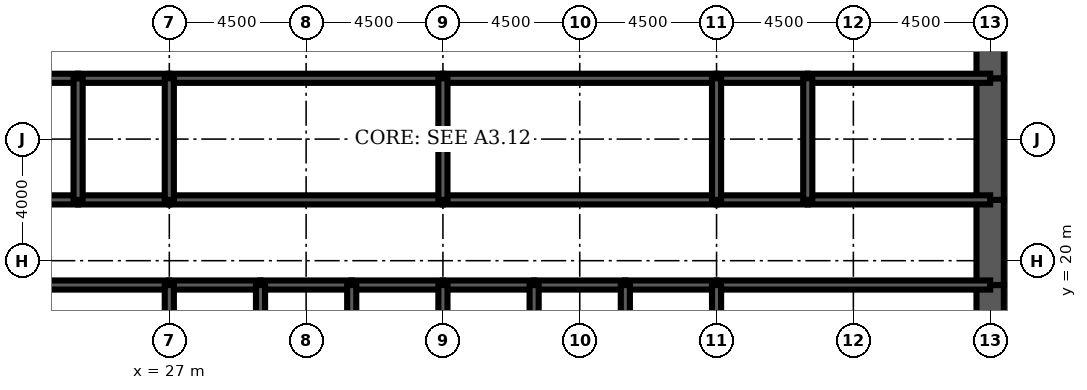
"""IFC4 building model, lengths in metres.
Left out: names, types, materials, properties, quantities, classifications, styles, units other than length and angle.
Written with IfcOpenShell. Run it as: python <this file> out.ifc"""

import sys

from ifc_helpers import new_model, si_unit, direction, frame, frame_2d, origin, place, context, subcontext, project, spatial, rectangle, extrude, element, fill, save


model = new_model("IFC4")
c1 = context("Model", 3, precision=1e-05, world=origin(), true_north=direction((0.0, 1.0)))
c2 = subcontext(c1, "Body", "Model", "MODEL_VIEW")
j1 = project(units=[si_unit("LENGTHUNIT", "METRE"), si_unit("PLANEANGLEUNIT", "RADIAN")], contexts=[c1])
p1 = place(None, origin())
s1 = spatial("IfcSite", under=j1, at=p1, CompositionType="ELEMENT")
p2 = place(p1, origin())
s2 = spatial("IfcBuilding", under=s1, at=p2, CompositionType="ELEMENT")
p3 = place(p2, frame((0.0, 0.0, 50.0)))
s3 = spatial("IfcBuildingStorey", under=s2, at=p3, CompositionType="ELEMENT", Elevation=50.0)
p4 = place(p3, frame((54.0, 16.0, 0.0), z_axis=(0.0, 0.0, 1.0), x_axis=(0.0, 1.0, 0.0)))
e1 = element("IfcWall", 1, at=p4, inside=s3, PredefinedType="SHEAR", context=c2, shape_type="SweptSolid", body=[
    extrude(rectangle(XDim=3.2, YDim=0.9, at=frame_2d((1.6, 0.0))), origin(), (0.0, 0.0, 1.0), 4.5),
])
p5 = place(p3, frame((54.0, 19.2, 0.0), z_axis=(0.0, 0.0, 1.0), x_axis=(0.0, 1.0, 0.0)))
e2 = element("IfcWall", 2, at=p5, inside=s3, PredefinedType="SHEAR", context=c2, shape_type="SweptSolid", body=[
    extrude(rectangle(XDim=2.8, YDim=0.9, at=frame_2d((1.4, 0.0))), origin(), (0.0, 0.0, 1.0), 4.5),
])
p6 = place(p5, frame((0.4, 0.0, 0.0)))
e3 = element("IfcOpeningElement", 3, at=p6, cuts=e2, PredefinedType="OPENING", context=c2, shape_type="SweptSolid", body=[
    extrude(rectangle(XDim=1.8, YDim=2.1, at=frame_2d((0.9, 1.05))), frame((0.0, 0.46, 0.0), z_axis=(0.0, -1.0, 0.0), x_axis=(1.0, 0.0, 0.0)), (0.0, 0.0, 1.0), 0.92),
])
p7 = place(p3, frame((54.0, 22.0, 0.0), z_axis=(0.0, 0.0, 1.0), x_axis=(0.0, 1.0, 0.0)))
e4 = element("IfcWall", 4, at=p7, inside=s3, PredefinedType="SHEAR", context=c2, shape_type="SweptSolid", body=[
    extrude(rectangle(XDim=4.0, YDim=0.9, at=frame_2d((2.0, 0.0))), origin(), (0.0, 0.0, 1.0), 4.5),
])
p8 = place(p3, frame((54.0, 26.0, 0.0), z_axis=(0.0, 0.0, 1.0), x_axis=(0.0, 1.0, 0.0)))
e5 = element("IfcWall", 5, at=p8, inside=s3, PredefinedType="SHEAR", context=c2, shape_type="SweptSolid", body=[
    extrude(rectangle(XDim=2.8, YDim=0.9, at=frame_2d((1.4, 0.0))), origin(), (0.0, 0.0, 1.0), 4.5),
])
p9 = place(p8, frame((0.6, 0.0, 0.0)))
e6 = element("IfcOpeningElement", 6, at=p9, cuts=e5, PredefinedType="OPENING", context=c2, shape_type="SweptSolid", body=[
    extrude(rectangle(XDim=1.8, YDim=2.1, at=frame_2d((0.9, 1.05))), frame((0.0, 0.46, 0.0), z_axis=(0.0, -1.0, 0.0), x_axis=(1.0, 0.0, 0.0)), (0.0, 0.0, 1.0), 0.92),
])
p10 = place(p3, frame((18.0, 19.2, 0.0), z_axis=(0.0, 0.0, 1.0), x_axis=(1.0, 0.0, 0.0)))
e7 = element("IfcWall", 7, at=p10, inside=s3, PredefinedType="SOLIDWALL", context=c2, shape_type="SweptSolid", body=[
    extrude(rectangle(XDim=9.0, YDim=0.3, at=frame_2d((4.5, 0.0))), origin(), (0.0, 0.0, 1.0), 4.5),
])
p11 = place(p10, frame((0.65, 0.0, 0.0)))
e8 = element("IfcOpeningElement", 8, at=p11, cuts=e7, PredefinedType="OPENING", context=c2, shape_type="SweptSolid", body=[
    extrude(rectangle(XDim=1.0, YDim=2.1, at=frame_2d((0.5, 1.05))), frame((0.0, 0.16, 0.0), z_axis=(0.0, -1.0, 0.0), x_axis=(1.0, 0.0, 0.0)), (0.0, 0.0, 1.0), 0.32),
])
p12 = place(p3, frame((27.0, 19.2, 0.0), z_axis=(0.0, 0.0, 1.0), x_axis=(1.0, 0.0, 0.0)))
e9 = element("IfcWall", 9, at=p12, inside=s3, PredefinedType="SOLIDWALL", context=c2, shape_type="SweptSolid", body=[
    extrude(rectangle(XDim=3.0, YDim=0.3, at=frame_2d((1.5, 0.0))), origin(), (0.0, 0.0, 1.0), 4.5),
])
p13 = place(p12, frame((0.95, 0.0, 0.0)))
e10 = element("IfcOpeningElement", 10, at=p13, cuts=e9, PredefinedType="OPENING", context=c2, shape_type="SweptSolid", body=[
    extrude(rectangle(XDim=1.1, YDim=2.2, at=frame_2d((0.55, 1.1))), frame((0.0, 0.16, 0.0), z_axis=(0.0, -1.0, 0.0), x_axis=(1.0, 0.0, 0.0)), (0.0, 0.0, 1.0), 0.32),
])
p14 = place(p3, frame((30.0, 19.2, 0.0), z_axis=(0.0, 0.0, 1.0), x_axis=(1.0, 0.0, 0.0)))
e11 = element("IfcWall", 11, at=p14, inside=s3, PredefinedType="SOLIDWALL", context=c2, shape_type="SweptSolid", body=[
    extrude(rectangle(XDim=3.0, YDim=0.3, at=frame_2d((1.5, 0.0))), origin(), (0.0, 0.0, 1.0), 4.5),
])
p15 = place(p14, frame((0.95, 0.0, 0.0)))
e12 = element("IfcOpeningElement", 12, at=p15, cuts=e11, PredefinedType="OPENING", context=c2, shape_type="SweptSolid", body=[
    extrude(rectangle(XDim=1.1, YDim=2.2, at=frame_2d((0.55, 1.1))), frame((0.0, 0.16, 0.0), z_axis=(0.0, -1.0, 0.0), x_axis=(1.0, 0.0, 0.0)), (0.0, 0.0, 1.0), 0.32),
])
p16 = place(p3, frame((33.0, 19.2, 0.0), z_axis=(0.0, 0.0, 1.0), x_axis=(1.0, 0.0, 0.0)))
e13 = element("IfcWall", 13, at=p16, inside=s3, PredefinedType="SOLIDWALL", context=c2, shape_type="SweptSolid", body=[
    extrude(rectangle(XDim=3.0, YDim=0.3, at=frame_2d((1.5, 0.0))), origin(), (0.0, 0.0, 1.0), 4.5),
])
p17 = place(p16, frame((0.95, 0.0, 0.0)))
e14 = element("IfcOpeningElement", 14, at=p17, cuts=e13, PredefinedType="OPENING", context=c2, shape_type="SweptSolid", body=[
    extrude(rectangle(XDim=1.1, YDim=2.2, at=frame_2d((0.55, 1.1))), frame((0.0, 0.16, 0.0), z_axis=(0.0, -1.0, 0.0), x_axis=(1.0, 0.0, 0.0)), (0.0, 0.0, 1.0), 0.32),
])
p18 = place(p3, frame((36.0, 19.2, 0.0), z_axis=(0.0, 0.0, 1.0), x_axis=(1.0, 0.0, 0.0)))
e15 = element("IfcWall", 15, at=p18, inside=s3, PredefinedType="SOLIDWALL", context=c2, shape_type="SweptSolid", body=[
    extrude(rectangle(XDim=3.0, YDim=0.3, at=frame_2d((1.5, 0.0))), origin(), (0.0, 0.0, 1.0), 4.5),
])
p19 = place(p18, frame((0.95, 0.0, 0.0)))
e16 = element("IfcOpeningElement", 16, at=p19, cuts=e15, PredefinedType="OPENING", context=c2, shape_type="SweptSolid", body=[
    extrude(rectangle(XDim=1.1, YDim=2.2, at=frame_2d((0.55, 1.1))), frame((0.0, 0.16, 0.0), z_axis=(0.0, -1.0, 0.0), x_axis=(1.0, 0.0, 0.0)), (0.0, 0.0, 1.0), 0.32),
])
for number, where, z_axis, x_axis in (
    (17, (39.0, 19.2, 0.0), (0.0, 0.0, 1.0), (1.0, 0.0, 0.0)),
    (18, (42.0, 19.2, 0.0), (0.0, 0.0, 1.0), (1.0, 0.0, 0.0)),
):
    element("IfcWall", number, at=place(p3, frame(where, z_axis=z_axis, x_axis=x_axis)), inside=s3, PredefinedType="SOLIDWALL", context=c2, shape_type="SweptSolid", body=[
        extrude(rectangle(XDim=3.0, YDim=0.3, at=frame_2d((1.5, 0.0))), origin(), (0.0, 0.0, 1.0), 4.5),
    ])
p20 = place(p3, frame((45.0, 19.2, 0.0), z_axis=(0.0, 0.0, 1.0), x_axis=(1.0, 0.0, 0.0)))
e19 = element("IfcWall", 19, at=p20, inside=s3, PredefinedType="SOLIDWALL", context=c2, shape_type="SweptSolid", body=[
    extrude(rectangle(XDim=9.0, YDim=0.3, at=frame_2d((4.5, 0.0))), origin(), (0.0, 0.0, 1.0), 4.5),
])
p21 = place(p20, frame((7.35, 0.0, 0.0)))
e20 = element("IfcOpeningElement", 20, at=p21, cuts=e19, PredefinedType="OPENING", context=c2, shape_type="SweptSolid", body=[
    extrude(rectangle(XDim=1.0, YDim=2.1, at=frame_2d((0.5, 1.05))), frame((0.0, 0.16, 0.0), z_axis=(0.0, -1.0, 0.0), x_axis=(1.0, 0.0, 0.0)), (0.0, 0.0, 1.0), 0.32),
])
p22 = place(p3, frame((18.0, 22.0, 0.0), z_axis=(0.0, 0.0, 1.0), x_axis=(1.0, 0.0, 0.0)))
e21 = element("IfcWall", 21, at=p22, inside=s3, PredefinedType="SOLIDWALL", context=c2, shape_type="SweptSolid", body=[
    extrude(rectangle(XDim=6.0, YDim=0.3, at=frame_2d((3.0, 0.0))), origin(), (0.0, 0.0, 1.0), 4.5),
])
p23 = place(p22, frame((2.0, 0.0, 0.0)))
e22 = element("IfcOpeningElement", 22, at=p23, cuts=e21, PredefinedType="OPENING", context=c2, shape_type="SweptSolid", body=[
    extrude(rectangle(XDim=1.0, YDim=2.1, at=frame_2d((0.5, 1.05))), frame((0.0, 0.16, 0.0), z_axis=(0.0, -1.0, 0.0), x_axis=(1.0, 0.0, 0.0)), (0.0, 0.0, 1.0), 0.32),
])
p24 = place(p3, frame((24.0, 22.0, 0.0), z_axis=(0.0, 0.0, 1.0), x_axis=(1.0, 0.0, 0.0)))
e23 = element("IfcWall", 23, at=p24, inside=s3, PredefinedType="SOLIDWALL", context=c2, shape_type="SweptSolid", body=[
    extrude(rectangle(XDim=3.0, YDim=0.3, at=frame_2d((1.5, 0.0))), origin(), (0.0, 0.0, 1.0), 4.5),
])
p25 = place(p24, frame((1.0, 0.0, 0.0)))
e24 = element("IfcOpeningElement", 24, at=p25, cuts=e23, PredefinedType="OPENING", context=c2, shape_type="SweptSolid", body=[
    extrude(rectangle(XDim=1.0, YDim=2.1, at=frame_2d((0.5, 1.05))), frame((0.0, 0.16, 0.0), z_axis=(0.0, -1.0, 0.0), x_axis=(1.0, 0.0, 0.0)), (0.0, 0.0, 1.0), 0.32),
])
p26 = place(p3, frame((27.0, 22.0, 0.0), z_axis=(0.0, 0.0, 1.0), x_axis=(1.0, 0.0, 0.0)))
e25 = element("IfcWall", 25, at=p26, inside=s3, PredefinedType="SOLIDWALL", context=c2, shape_type="SweptSolid", body=[
    extrude(rectangle(XDim=9.0, YDim=0.3, at=frame_2d((4.5, 0.0))), origin(), (0.0, 0.0, 1.0), 4.5),
])
p27 = place(p26, frame((4.0, 0.0, 0.0)))
e26 = element("IfcOpeningElement", 26, at=p27, cuts=e25, PredefinedType="OPENING", context=c2, shape_type="SweptSolid", body=[
    extrude(rectangle(XDim=1.0, YDim=2.1, at=frame_2d((0.5, 1.05))), frame((0.0, 0.16, 0.0), z_axis=(0.0, -1.0, 0.0), x_axis=(1.0, 0.0, 0.0)), (0.0, 0.0, 1.0), 0.32),
])
p28 = place(p3, frame((36.0, 22.0, 0.0), z_axis=(0.0, 0.0, 1.0), x_axis=(1.0, 0.0, 0.0)))
e27 = element("IfcWall", 27, at=p28, inside=s3, PredefinedType="SOLIDWALL", context=c2, shape_type="SweptSolid", body=[
    extrude(rectangle(XDim=9.0, YDim=0.3, at=frame_2d((4.5, 0.0))), origin(), (0.0, 0.0, 1.0), 4.5),
])
p29 = place(p28, frame((4.0, 0.0, 0.0)))
e28 = element("IfcOpeningElement", 28, at=p29, cuts=e27, PredefinedType="OPENING", context=c2, shape_type="SweptSolid", body=[
    extrude(rectangle(XDim=1.0, YDim=2.1, at=frame_2d((0.5, 1.05))), frame((0.0, 0.16, 0.0), z_axis=(0.0, -1.0, 0.0), x_axis=(1.0, 0.0, 0.0)), (0.0, 0.0, 1.0), 0.32),
])
p30 = place(p3, frame((45.0, 22.0, 0.0), z_axis=(0.0, 0.0, 1.0), x_axis=(1.0, 0.0, 0.0)))
e29 = element("IfcWall", 29, at=p30, inside=s3, PredefinedType="SOLIDWALL", context=c2, shape_type="SweptSolid", body=[
    extrude(rectangle(XDim=3.0, YDim=0.3, at=frame_2d((1.5, 0.0))), origin(), (0.0, 0.0, 1.0), 4.5),
])
p31 = place(p30, frame((1.0, 0.0, 0.0)))
e30 = element("IfcOpeningElement", 30, at=p31, cuts=e29, PredefinedType="OPENING", context=c2, shape_type="SweptSolid", body=[
    extrude(rectangle(XDim=1.0, YDim=2.1, at=frame_2d((0.5, 1.05))), frame((0.0, 0.16, 0.0), z_axis=(0.0, -1.0, 0.0), x_axis=(1.0, 0.0, 0.0)), (0.0, 0.0, 1.0), 0.32),
])
p32 = place(p3, frame((48.0, 22.0, 0.0), z_axis=(0.0, 0.0, 1.0), x_axis=(1.0, 0.0, 0.0)))
e31 = element("IfcWall", 31, at=p32, inside=s3, PredefinedType="SOLIDWALL", context=c2, shape_type="SweptSolid", body=[
    extrude(rectangle(XDim=6.0, YDim=0.3, at=frame_2d((3.0, 0.0))), origin(), (0.0, 0.0, 1.0), 4.5),
])
p33 = place(p32, frame((2.0, 0.0, 0.0)))
e32 = element("IfcOpeningElement", 32, at=p33, cuts=e31, PredefinedType="OPENING", context=c2, shape_type="SweptSolid", body=[
    extrude(rectangle(XDim=1.0, YDim=2.1, at=frame_2d((0.5, 1.05))), frame((0.0, 0.16, 0.0), z_axis=(0.0, -1.0, 0.0), x_axis=(1.0, 0.0, 0.0)), (0.0, 0.0, 1.0), 0.32),
])
p34 = place(p32, frame((4.3, 0.0, 0.0)))
e33 = element("IfcOpeningElement", 33, at=p34, cuts=e31, PredefinedType="OPENING", context=c2, shape_type="SweptSolid", body=[
    extrude(rectangle(XDim=1.0, YDim=2.1, at=frame_2d((0.5, 1.05))), frame((0.0, 0.16, 0.0), z_axis=(0.0, -1.0, 0.0), x_axis=(1.0, 0.0, 0.0)), (0.0, 0.0, 1.0), 0.32),
])
p35 = place(p3, frame((18.0, 26.0, 0.0), z_axis=(0.0, 0.0, 1.0), x_axis=(1.0, 0.0, 0.0)))
e34 = element("IfcWall", 34, at=p35, inside=s3, PredefinedType="SOLIDWALL", context=c2, shape_type="SweptSolid", body=[
    extrude(rectangle(XDim=6.0, YDim=0.3, at=frame_2d((3.0, 0.0))), origin(), (0.0, 0.0, 1.0), 4.5),
])
p36 = place(p3, frame((24.0, 26.0, 0.0), z_axis=(0.0, 0.0, 1.0), x_axis=(1.0, 0.0, 0.0)))
e35 = element("IfcWall", 35, at=p36, inside=s3, PredefinedType="SOLIDWALL", context=c2, shape_type="SweptSolid", body=[
    extrude(rectangle(XDim=3.0, YDim=0.3, at=frame_2d((1.5, 0.0))), origin(), (0.0, 0.0, 1.0), 4.5),
])
for number, where, z_axis, x_axis in (
    (36, (27.0, 26.0, 0.0), (0.0, 0.0, 1.0), (1.0, 0.0, 0.0)),
    (37, (36.0, 26.0, 0.0), (0.0, 0.0, 1.0), (1.0, 0.0, 0.0)),
):
    element("IfcWall", number, at=place(p3, frame(where, z_axis=z_axis, x_axis=x_axis)), inside=s3, PredefinedType="SOLIDWALL", context=c2, shape_type="SweptSolid", body=[
        extrude(rectangle(XDim=9.0, YDim=0.3, at=frame_2d((4.5, 0.0))), origin(), (0.0, 0.0, 1.0), 4.5),
    ])
p37 = place(p3, frame((45.0, 26.0, 0.0), z_axis=(0.0, 0.0, 1.0), x_axis=(1.0, 0.0, 0.0)))
e38 = element("IfcWall", 38, at=p37, inside=s3, PredefinedType="SOLIDWALL", context=c2, shape_type="SweptSolid", body=[
    extrude(rectangle(XDim=3.0, YDim=0.3, at=frame_2d((1.5, 0.0))), origin(), (0.0, 0.0, 1.0), 4.5),
])
p38 = place(p3, frame((48.0, 26.0, 0.0), z_axis=(0.0, 0.0, 1.0), x_axis=(1.0, 0.0, 0.0)))
e39 = element("IfcWall", 39, at=p38, inside=s3, PredefinedType="SOLIDWALL", context=c2, shape_type="SweptSolid", body=[
    extrude(rectangle(XDim=6.0, YDim=0.3, at=frame_2d((3.0, 0.0))), origin(), (0.0, 0.0, 1.0), 4.5),
])
for number, where, z_axis, x_axis in (
    (40, (27.0, 16.0, 0.0), (0.0, 0.0, 1.0), (0.0, 1.0, 0.0)),
    (41, (30.0, 16.0, 0.0), (0.0, 0.0, 1.0), (0.0, 1.0, 0.0)),
    (42, (33.0, 16.0, 0.0), (0.0, 0.0, 1.0), (0.0, 1.0, 0.0)),
    (43, (36.0, 16.0, 0.0), (0.0, 0.0, 1.0), (0.0, 1.0, 0.0)),
    (44, (39.0, 16.0, 0.0), (0.0, 0.0, 1.0), (0.0, 1.0, 0.0)),
    (45, (42.0, 16.0, 0.0), (0.0, 0.0, 1.0), (0.0, 1.0, 0.0)),
    (46, (45.0, 16.0, 0.0), (0.0, 0.0, 1.0), (0.0, 1.0, 0.0)),
):
    element("IfcWall", number, at=place(p3, frame(where, z_axis=z_axis, x_axis=x_axis)), inside=s3, PredefinedType="SOLIDWALL", context=c2, shape_type="SweptSolid", body=[
        extrude(rectangle(XDim=3.2, YDim=0.3, at=frame_2d((1.6, 0.0))), origin(), (0.0, 0.0, 1.0), 4.5),
    ])
for number, where, z_axis, x_axis in (
    (47, (24.0, 22.0, 0.0), (0.0, 0.0, 1.0), (0.0, 1.0, 0.0)),
    (48, (27.0, 22.0, 0.0), (0.0, 0.0, 1.0), (0.0, 1.0, 0.0)),
    (49, (36.0, 22.0, 0.0), (0.0, 0.0, 1.0), (0.0, 1.0, 0.0)),
    (50, (45.0, 22.0, 0.0), (0.0, 0.0, 1.0), (0.0, 1.0, 0.0)),
    (51, (48.0, 22.0, 0.0), (0.0, 0.0, 1.0), (0.0, 1.0, 0.0)),
):
    element("IfcWall", number, at=place(p3, frame(where, z_axis=z_axis, x_axis=x_axis)), inside=s3, PredefinedType="SOLIDWALL", context=c2, shape_type="SweptSolid", body=[
        extrude(rectangle(XDim=4.0, YDim=0.3, at=frame_2d((2.0, 0.0))), origin(), (0.0, 0.0, 1.0), 4.5),
    ])
p39 = place(p3, frame((38.0, 22.15, 0.0), z_axis=(0.0, 0.0, 1.0), x_axis=(0.0, 1.0, 0.0)))
e52 = element("IfcWall", 52, at=p39, inside=s3, PredefinedType="PARTITIONING", context=c2, shape_type="SweptSolid", body=[
    extrude(rectangle(XDim=3.7, YDim=0.15, at=frame_2d((1.85, 0.0))), origin(), (0.0, 0.0, 1.0), 3.0),
])
p40 = place(p39, frame((2.2, 0.0, 0.0)))
e53 = element("IfcOpeningElement", 53, at=p40, cuts=e52, PredefinedType="OPENING", context=c2, shape_type="SweptSolid", body=[
    extrude(rectangle(XDim=1.0, YDim=2.1, at=frame_2d((0.5, 1.05))), frame((0.0, 0.085, 0.0), z_axis=(0.0, -1.0, 0.0), x_axis=(1.0, 0.0, 0.0)), (0.0, 0.0, 1.0), 0.17),
])
p41 = place(p3, frame((51.975, 22.15, 0.0), z_axis=(0.0, 0.0, 1.0), x_axis=(0.0, 1.0, 0.0)))
e54 = element("IfcWall", 54, at=p41, inside=s3, PredefinedType="PARTITIONING", context=c2, shape_type="SweptSolid", body=[
    extrude(rectangle(XDim=3.7, YDim=0.15, at=frame_2d((1.85, 0.0))), origin(), (0.0, 0.0, 1.0), 3.0),
])
p42 = place(p3, frame((49.4, 19.35, 0.0), z_axis=(0.0, 0.0, 1.0), x_axis=(0.0, 1.0, 0.0)))
e55 = element("IfcWall", 55, at=p42, inside=s3, PredefinedType="PARTITIONING", context=c2, shape_type="SweptSolid", body=[
    extrude(rectangle(XDim=2.5, YDim=0.15, at=frame_2d((1.25, 0.0))), origin(), (0.0, 0.0, 1.0), 3.0),
])
p43 = place(p42, frame((1.15, 0.0, 0.0)))
e56 = element("IfcOpeningElement", 56, at=p43, cuts=e55, PredefinedType="OPENING", context=c2, shape_type="SweptSolid", body=[
    extrude(rectangle(XDim=1.0, YDim=2.1, at=frame_2d((0.5, 1.05))), frame((0.0, 0.085, 0.0), z_axis=(0.0, -1.0, 0.0), x_axis=(1.0, 0.0, 0.0)), (0.0, 0.0, 1.0), 0.17),
])
p44 = place(p40, origin())
e57 = element("IfcDoor", 57, at=p44, inside=s3, OperationType="SINGLE_SWING_RIGHT", PredefinedType="DOOR", context=c2, shape_type="SweptSolid", body=[
    extrude(rectangle(XDim=1.0, YDim=2.1, at=frame_2d((0.5, 1.05))), frame((0.0, 0.025, 0.0), z_axis=(0.0, -1.0, 0.0), x_axis=(1.0, 0.0, 0.0)), (0.0, 0.0, 1.0), 0.05),
])
fill(e53, e57)
p45 = place(p43, origin())
e58 = element("IfcDoor", 58, at=p45, inside=s3, OperationType="SINGLE_SWING_RIGHT", PredefinedType="DOOR", context=c2, shape_type="SweptSolid", body=[
    extrude(rectangle(XDim=1.0, YDim=2.1, at=frame_2d((0.5, 1.05))), frame((0.0, 0.025, 0.0), z_axis=(0.0, -1.0, 0.0), x_axis=(1.0, 0.0, 0.0)), (0.0, 0.0, 1.0), 0.05),
])
fill(e56, e58)
p46 = place(p13, origin())
e59 = element("IfcDoor", 59, at=p46, inside=s3, OperationType="DOUBLE_DOOR_SLIDING", PredefinedType="USERDEFINED", context=c2, shape_type="SweptSolid", body=[
    extrude(rectangle(XDim=1.1, YDim=2.2, at=frame_2d((0.55, 1.1))), frame((0.0, 0.025, 0.0), z_axis=(0.0, -1.0, 0.0), x_axis=(1.0, 0.0, 0.0)), (0.0, 0.0, 1.0), 0.05),
])
fill(e10, e59)
p47 = place(p15, origin())
e60 = element("IfcDoor", 60, at=p47, inside=s3, OperationType="DOUBLE_DOOR_SLIDING", PredefinedType="USERDEFINED", context=c2, shape_type="SweptSolid", body=[
    extrude(rectangle(XDim=1.1, YDim=2.2, at=frame_2d((0.55, 1.1))), frame((0.0, 0.025, 0.0), z_axis=(0.0, -1.0, 0.0), x_axis=(1.0, 0.0, 0.0)), (0.0, 0.0, 1.0), 0.05),
])
fill(e12, e60)
p48 = place(p17, origin())
e61 = element("IfcDoor", 61, at=p48, inside=s3, OperationType="DOUBLE_DOOR_SLIDING", PredefinedType="USERDEFINED", context=c2, shape_type="SweptSolid", body=[
    extrude(rectangle(XDim=1.1, YDim=2.2, at=frame_2d((0.55, 1.1))), frame((0.0, 0.025, 0.0), z_axis=(0.0, -1.0, 0.0), x_axis=(1.0, 0.0, 0.0)), (0.0, 0.0, 1.0), 0.05),
])
fill(e14, e61)
p49 = place(p19, origin())
e62 = element("IfcDoor", 62, at=p49, inside=s3, OperationType="DOUBLE_DOOR_SLIDING", PredefinedType="USERDEFINED", context=c2, shape_type="SweptSolid", body=[
    extrude(rectangle(XDim=1.1, YDim=2.2, at=frame_2d((0.55, 1.1))), frame((0.0, 0.025, 0.0), z_axis=(0.0, -1.0, 0.0), x_axis=(1.0, 0.0, 0.0)), (0.0, 0.0, 1.0), 0.05),
])
fill(e16, e62)
p50 = place(p21, origin())
e63 = element("IfcDoor", 63, at=p50, inside=s3, OperationType="SINGLE_SWING_RIGHT", PredefinedType="DOOR", context=c2, shape_type="SweptSolid", body=[
    extrude(rectangle(XDim=1.0, YDim=2.1, at=frame_2d((0.5, 1.05))), frame((0.0, 0.025, 0.0), z_axis=(0.0, -1.0, 0.0), x_axis=(1.0, 0.0, 0.0)), (0.0, 0.0, 1.0), 0.05),
])
fill(e20, e63)
p51 = place(p6, origin())
e64 = element("IfcDoor", 64, at=p51, inside=s3, OperationType="SINGLE_SWING_LEFT", PredefinedType="DOOR", context=c2, shape_type="SweptSolid", body=[
    extrude(rectangle(XDim=1.8, YDim=2.1, at=frame_2d((0.9, 1.05))), frame((0.0, 0.45, 0.0), z_axis=(0.0, -1.0, 0.0), x_axis=(1.0, 0.0, 0.0)), (0.0, 0.0, 1.0), 0.899),
])
fill(e3, e64)
p52 = place(p9, origin())
e65 = element("IfcDoor", 65, at=p52, inside=s3, OperationType="SINGLE_SWING_LEFT", PredefinedType="DOOR", context=c2, shape_type="SweptSolid", body=[
    extrude(rectangle(XDim=1.8, YDim=2.1, at=frame_2d((0.9, 1.05))), frame((0.0, 0.45, 0.0), z_axis=(0.0, -1.0, 0.0), x_axis=(1.0, 0.0, 0.0)), (0.0, 0.0, 1.0), 0.899),
])
fill(e6, e65)
p53 = place(p25, origin())
e66 = element("IfcDoor", 66, at=p53, inside=s3, OperationType="SINGLE_SWING_LEFT", PredefinedType="DOOR", context=c2, shape_type="SweptSolid", body=[
    extrude(rectangle(XDim=1.0, YDim=2.1, at=frame_2d((0.5, 1.05))), frame((0.0, 0.025, 0.0), z_axis=(0.0, -1.0, 0.0), x_axis=(1.0, 0.0, 0.0)), (0.0, 0.0, 1.0), 0.05),
])
fill(e24, e66)
p54 = place(p27, origin())
e67 = element("IfcDoor", 67, at=p54, inside=s3, OperationType="SINGLE_SWING_LEFT", PredefinedType="DOOR", context=c2, shape_type="SweptSolid", body=[
    extrude(rectangle(XDim=1.0, YDim=2.1, at=frame_2d((0.5, 1.05))), frame((0.0, 0.025, 0.0), z_axis=(0.0, -1.0, 0.0), x_axis=(1.0, 0.0, 0.0)), (0.0, 0.0, 1.0), 0.05),
])
fill(e26, e67)
p55 = place(p29, origin())
e68 = element("IfcDoor", 68, at=p55, inside=s3, OperationType="SINGLE_SWING_LEFT", PredefinedType="DOOR", context=c2, shape_type="SweptSolid", body=[
    extrude(rectangle(XDim=1.0, YDim=2.1, at=frame_2d((0.5, 1.05))), frame((0.0, 0.025, 0.0), z_axis=(0.0, -1.0, 0.0), x_axis=(1.0, 0.0, 0.0)), (0.0, 0.0, 1.0), 0.05),
])
fill(e28, e68)
p56 = place(p31, origin())
e69 = element("IfcDoor", 69, at=p56, inside=s3, OperationType="SINGLE_SWING_LEFT", PredefinedType="DOOR", context=c2, shape_type="SweptSolid", body=[
    extrude(rectangle(XDim=1.0, YDim=2.1, at=frame_2d((0.5, 1.05))), frame((0.0, 0.025, 0.0), z_axis=(0.0, -1.0, 0.0), x_axis=(1.0, 0.0, 0.0)), (0.0, 0.0, 1.0), 0.05),
])
fill(e30, e69)
p57 = place(p33, origin())
e70 = element("IfcDoor", 70, at=p57, inside=s3, OperationType="SINGLE_SWING_LEFT", PredefinedType="DOOR", context=c2, shape_type="SweptSolid", body=[
    extrude(rectangle(XDim=1.0, YDim=2.1, at=frame_2d((0.5, 1.05))), frame((0.0, 0.025, 0.0), z_axis=(0.0, -1.0, 0.0), x_axis=(1.0, 0.0, 0.0)), (0.0, 0.0, 1.0), 0.05),
])
fill(e32, e70)
p58 = place(p34, origin())
e71 = element("IfcDoor", 71, at=p58, inside=s3, OperationType="SINGLE_SWING_RIGHT", PredefinedType="DOOR", context=c2, shape_type="SweptSolid", body=[
    extrude(rectangle(XDim=1.0, YDim=2.1, at=frame_2d((0.5, 1.05))), frame((0.0, 0.025, 0.0), z_axis=(0.0, -1.0, 0.0), x_axis=(1.0, 0.0, 0.0)), (0.0, 0.0, 1.0), 0.05),
])
fill(e33, e71)
save(model, sys.argv[1])
